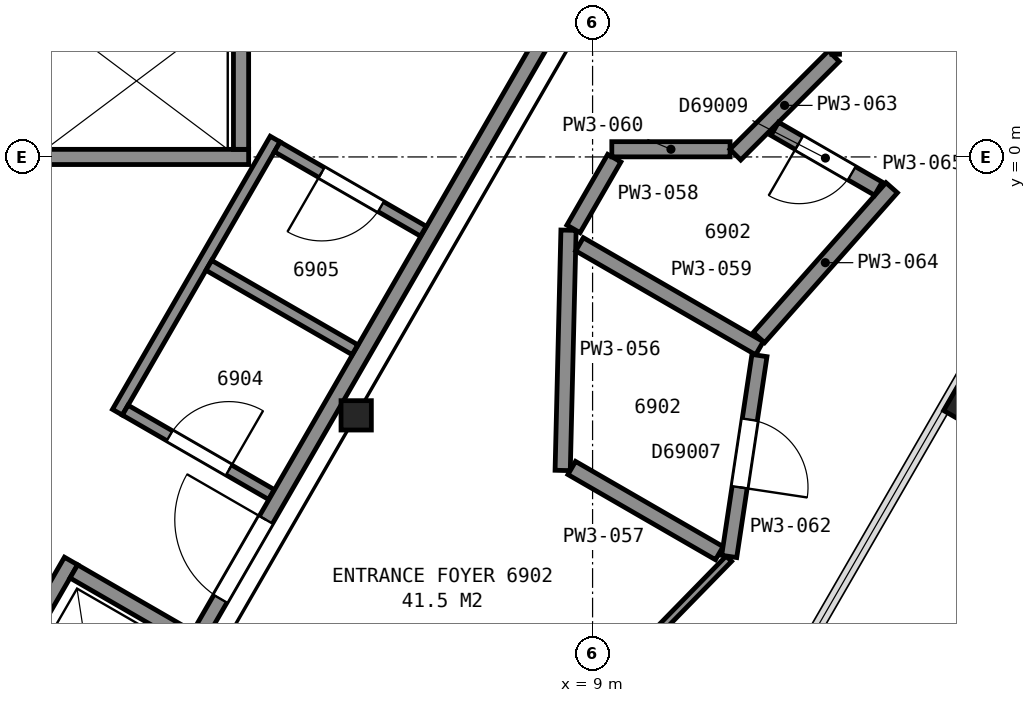
"""IFC4 building model, lengths in metres.
Left out: names, types, materials, properties, quantities, classifications, styles, units other than length and angle.
Written with IfcOpenShell. Run it as: python <this file> out.ifc"""

import sys

from ifc_helpers import new_model, si_unit, direction, frame, frame_2d, origin, origin_2d, place, context, subcontext, project, spatial, rectangle, i_section, extrude, element, fill, save


model = new_model("IFC4")
c1 = context("Model", 3, precision=1e-05, world=origin(), true_north=direction((0.0, 1.0)))
c2 = subcontext(c1, "Body", "Model", "MODEL_VIEW")
j1 = project(units=[si_unit("LENGTHUNIT", "METRE"), si_unit("PLANEANGLEUNIT", "RADIAN")], contexts=[c1])
p1 = place(None, origin())
s1 = spatial("IfcSite", under=j1, at=p1, CompositionType="ELEMENT")
p2 = place(p1, origin())
s2 = spatial("IfcBuilding", under=s1, at=p2, CompositionType="ELEMENT")
p3 = place(p2, frame((0.0, 0.0, 275.1)))
s3 = spatial("IfcBuildingStorey", under=s2, at=p3, CompositionType="ELEMENT", Elevation=275.1)
p4 = place(p3, frame((13.88, -3.26, 0.0), z_axis=(0.0, 0.0, 1.0), x_axis=(-0.5, -0.866025403784, 0.0)))
e1 = element("IfcColumn", 1, at=p4, inside=s3, PredefinedType="COLUMN", context=c2, shape_type="SweptSolid", body=[
    extrude(i_section(OverallWidth=0.394, OverallDepth=0.376, WebThickness=0.017, FlangeThickness=0.028, FilletRadius=0.015, at=origin_2d()), origin(), (0.0, 0.0, 1.0), 3.7),
])
p5 = place(p3, frame((5.89, -3.4, 0.0), z_axis=(0.0, 0.0, 1.0), x_axis=(1.0, 0.0, 0.0)))
e2 = element("IfcColumn", 2, at=p5, inside=s3, PredefinedType="COLUMN", context=c2, shape_type="SweptSolid", body=[
    extrude(i_section(OverallWidth=0.399, OverallDepth=0.386, WebThickness=0.021, FlangeThickness=0.033, FilletRadius=0.015, at=origin_2d()), origin(), (0.0, 0.0, 1.0), 3.7),
])
p6 = place(p3, frame((1.525, 0.0, 0.0), z_axis=(0.0, 0.0, 1.0), x_axis=(1.0, 0.0, 0.0)))
e3 = element("IfcWall", 3, at=p6, inside=s3, PredefinedType="PARTITIONING", context=c2, shape_type="SweptSolid", body=[
    extrude(rectangle(XDim=2.95, YDim=0.2, at=frame_2d((1.475, 0.0))), origin(), (0.0, 0.0, 1.0), 3.7),
])
p7 = place(p3, frame((0.863, -7.525, 0.0), z_axis=(0.0, 0.0, 1.0), x_axis=(0.499990435942, 0.866030925526, 0.0)))
e4 = element("IfcWall", 4, at=p7, inside=s3, PredefinedType="PARTITIONING", context=c2, shape_type="SweptSolid", body=[
    extrude(rectangle(XDim=2.55, YDim=0.2, at=frame_2d((1.275, 0.0))), origin(), (0.0, 0.0, 1.0), 3.7),
])
p8 = place(p7, frame((0.725, 0.0, 0.0)))
e5 = element("IfcOpeningElement", 5, at=p8, cuts=e4, PredefinedType="OPENING", context=c2, shape_type="SweptSolid", body=[
    extrude(rectangle(XDim=1.1, YDim=2.1, at=frame_2d((0.55, 1.05))), frame((0.0, 0.11, 0.0), z_axis=(0.0, -1.0, 0.0), x_axis=(1.0, 0.0, 0.0)), (0.0, 0.0, 1.0), 0.22),
])
p9 = place(p3, frame((4.375, 0.1, 0.0), z_axis=(0.0, 0.0, 1.0), x_axis=(0.0, 1.0, 0.0)))
e6 = element("IfcWall", 6, at=p9, inside=s3, PredefinedType="PARTITIONING", context=c2, shape_type="SweptSolid", body=[
    extrude(rectangle(XDim=1.95, YDim=0.2, at=frame_2d((0.975, 0.0))), origin(), (0.0, 0.0, 1.0), 3.7),
])
p10 = place(p3, frame((3.69, -6.328, 0.0), z_axis=(0.0, 0.0, 1.0), x_axis=(-0.866036909293, 0.499980071345, 0.0)))
e7 = element("IfcWall", 7, at=p10, inside=s3, PredefinedType="PARTITIONING", context=c2, shape_type="SweptSolid", body=[
    extrude(rectangle(XDim=1.75, YDim=0.2, at=frame_2d((0.875, 0.0))), origin(), (0.0, 0.0, 1.0), 3.7),
])
p11 = place(p3, frame((2.749, -3.359, 0.0), z_axis=(0.0, 0.0, 1.0), x_axis=(0.500017827812, 0.866015110648, 0.0)))
e8 = element("IfcWall", 8, at=p11, inside=s3, PredefinedType="PARTITIONING", context=c2, shape_type="SweptSolid", body=[
    extrude(rectangle(XDim=4.15, YDim=0.15, at=frame_2d((2.075, 0.0))), origin(), (0.0, 0.0, 1.0), 3.45),
])
p12 = place(p3, frame((2.851, -3.332, 0.0), z_axis=(0.0, 0.0, 1.0), x_axis=(0.866110524189, -0.499852538144, 0.0)))
e9 = element("IfcWall", 9, at=p12, inside=s3, PredefinedType="PARTITIONING", context=c2, shape_type="SweptSolid", body=[
    extrude(rectangle(XDim=2.22, YDim=0.15, at=frame_2d((1.11, 0.0))), origin(), (0.0, 0.0, 1.0), 3.45),
])
p13 = place(p12, frame((0.675, 0.0, 0.0)))
e10 = element("IfcOpeningElement", 10, at=p13, cuts=e9, PredefinedType="OPENING", context=c2, shape_type="SweptSolid", body=[
    extrude(rectangle(XDim=0.9, YDim=2.1, at=frame_2d((0.45, 1.05))), frame((0.0, 0.085, 0.0), z_axis=(0.0, -1.0, 0.0), x_axis=(1.0, 0.0, 0.0)), (0.0, 0.0, 1.0), 0.17),
])
p14 = place(p3, frame((3.828, -6.29, 0.0), z_axis=(0.0, 0.0, 1.0), x_axis=(0.499979739078, 0.866037101117, 0.0)))
e11 = element("IfcWall", 11, at=p14, inside=s3, PredefinedType="PARTITIONING", context=c2, shape_type="SweptSolid", body=[
    extrude(rectangle(XDim=11.363, YDim=0.2, at=frame_2d((5.681, 0.0))), origin(), (0.0, 0.0, 1.0), 3.45),
])
p15 = place(p14, frame((0.55, 0.0, 0.0)))
e12 = element("IfcOpeningElement", 12, at=p15, cuts=e11, PredefinedType="OPENING", context=c2, shape_type="SweptSolid", body=[
    extrude(rectangle(XDim=1.2, YDim=2.1, at=frame_2d((0.6, 1.05))), frame((0.0, 0.11, 0.0), z_axis=(0.0, -1.0, 0.0), x_axis=(1.0, 0.0, 0.0)), (0.0, 0.0, 1.0), 0.22),
])
p16 = place(p3, frame((3.951, -1.427, 0.0), z_axis=(0.0, 0.0, 1.0), x_axis=(0.866062920605, -0.499935013329, 0.0)))
e13 = element("IfcWall", 13, at=p16, inside=s3, PredefinedType="PARTITIONING", context=c2, shape_type="SweptSolid", body=[
    extrude(rectangle(XDim=2.22, YDim=0.15, at=frame_2d((1.11, 0.0))), origin(), (0.0, 0.0, 1.0), 3.45),
])
p17 = place(p3, frame((6.774, -0.978, 0.0), z_axis=(0.0, 0.0, 1.0), x_axis=(-0.866062920605, 0.499935013329, 0.0)))
e14 = element("IfcWall", 14, at=p17, inside=s3, PredefinedType="PARTITIONING", context=c2, shape_type="SweptSolid", body=[
    extrude(rectangle(XDim=2.22, YDim=0.15, at=frame_2d((1.11, 0.0))), origin(), (0.0, 0.0, 1.0), 3.45),
])
p18 = place(p17, frame((0.646, 0.0, 0.0)))
e15 = element("IfcOpeningElement", 15, at=p18, cuts=e14, PredefinedType="OPENING", context=c2, shape_type="SweptSolid", body=[
    extrude(rectangle(XDim=0.9, YDim=2.1, at=frame_2d((0.45, 1.05))), frame((0.0, 0.085, 0.0), z_axis=(0.0, -1.0, 0.0), x_axis=(1.0, 0.0, 0.0)), (0.0, 0.0, 1.0), 0.17),
])
p19 = place(p3, frame((7.682, -8.47, 0.0), z_axis=(0.0, 0.0, 1.0), x_axis=(0.698777378461, 0.715339203002, 0.0)))
e16 = element("IfcWall", 16, at=p19, inside=s3, PredefinedType="PARTITIONING", context=c2, shape_type="SweptSolid", body=[
    extrude(rectangle(XDim=4.452, YDim=0.1, at=frame_2d((2.226, 0.0))), origin(), (0.0, 0.0, 1.0), 2.723),
])
p20 = place(p3, frame((8.607, -4.125, 0.0), z_axis=(0.0, 0.0, 1.0), x_axis=(0.024245593124, 0.999706032399, 0.0)))
e17 = element("IfcWall", 17, at=p20, inside=s3, PredefinedType="PARTITIONING", context=c2, shape_type="SweptSolid", body=[
    extrude(rectangle(XDim=3.162, YDim=0.2, at=frame_2d((1.581, 0.0))), origin(), (0.0, 0.0, 1.0), 2.723),
])
p21 = place(p3, frame((8.726, -4.093, 0.0), z_axis=(0.0, 0.0, 1.0), x_axis=(0.866056839033, -0.499945548598, 0.0)))
e18 = element("IfcWall", 18, at=p21, inside=s3, PredefinedType="PARTITIONING", context=c2, shape_type="SweptSolid", body=[
    extrude(rectangle(XDim=2.242, YDim=0.2, at=frame_2d((1.121, 0.0))), origin(), (0.0, 0.0, 1.0), 2.723),
])
p22 = place(p3, frame((8.749, -0.947, 0.0), z_axis=(0.0, 0.0, 1.0), x_axis=(0.499656913366, 0.866223394354, 0.0)))
e19 = element("IfcWall", 19, at=p22, inside=s3, PredefinedType="PARTITIONING", context=c2, shape_type="SweptSolid", body=[
    extrude(rectangle(XDim=1.075, YDim=0.2, at=frame_2d((0.538, 0.0))), origin(), (0.0, 0.0, 1.0), 2.723),
])
p23 = place(p3, frame((8.828, -1.149, 0.0), z_axis=(0.0, 0.0, 1.0), x_axis=(0.865853899269, -0.50029693695, 0.0)))
e20 = element("IfcWall", 20, at=p23, inside=s3, PredefinedType="PARTITIONING", context=c2, shape_type="SweptSolid", body=[
    extrude(rectangle(XDim=2.734, YDim=0.2, at=frame_2d((1.367, 0.0))), origin(), (0.0, 0.0, 1.0), 2.723),
])
p24 = place(p3, frame((9.253, 0.101, 0.0), z_axis=(0.0, 0.0, 1.0), x_axis=(1.0, 0.0, 0.0)))
e21 = element("IfcWall", 21, at=p24, inside=s3, PredefinedType="PARTITIONING", context=c2, shape_type="SweptSolid", body=[
    extrude(rectangle(XDim=1.556, YDim=0.2, at=frame_2d((0.778, 0.0))), origin(), (0.0, 0.0, 1.0), 2.723),
])
p25 = place(p3, frame((10.797, -5.256, 0.0), z_axis=(0.0, 0.0, 1.0), x_axis=(0.148961207986, 0.988843040384, 0.0)))
e22 = element("IfcWall", 22, at=p25, inside=s3, PredefinedType="PARTITIONING", context=c2, shape_type="SweptSolid", body=[
    extrude(rectangle(XDim=2.673, YDim=0.2, at=frame_2d((1.336, 0.0))), origin(), (0.0, 0.0, 1.0), 2.723),
])
p26 = place(p25, frame((0.92, 0.0, 0.0)))
e23 = element("IfcOpeningElement", 23, at=p26, cuts=e22, PredefinedType="OPENING", context=c2, shape_type="SweptSolid", body=[
    extrude(rectangle(XDim=0.9, YDim=2.1, at=frame_2d((0.45, 1.05))), frame((0.0, 0.11, 0.0), z_axis=(0.0, -1.0, 0.0), x_axis=(1.0, 0.0, 0.0)), (0.0, 0.0, 1.0), 0.22),
])
p27 = place(p3, frame((10.878, 0.03, 0.0), z_axis=(0.0, 0.0, 1.0), x_axis=(0.707173379423, 0.707040176677, 0.0)))
e24 = element("IfcWall", 24, at=p27, inside=s3, PredefinedType="PARTITIONING", context=c2, shape_type="SweptSolid", body=[
    extrude(rectangle(XDim=1.833, YDim=0.2, at=frame_2d((0.917, 0.0))), origin(), (0.0, 0.0, 1.0), 2.723),
])
p28 = place(p3, frame((11.188, -2.377, 0.0), z_axis=(0.0, 0.0, 1.0), x_axis=(0.663045631266, 0.748578981043, 0.0)))
e25 = element("IfcWall", 25, at=p28, inside=s3, PredefinedType="PARTITIONING", context=c2, shape_type="SweptSolid", body=[
    extrude(rectangle(XDim=2.635, YDim=0.2, at=frame_2d((1.317, 0.0))), origin(), (0.0, 0.0, 1.0), 2.723),
])
p29 = place(p3, frame((12.761, -0.417, 0.0), z_axis=(0.0, 0.0, 1.0), x_axis=(-0.866030680601, 0.499990860175, 0.0)))
e26 = element("IfcWall", 26, at=p29, inside=s3, PredefinedType="PARTITIONING", context=c2, shape_type="SweptSolid", body=[
    extrude(rectangle(XDim=1.575, YDim=0.2, at=frame_2d((0.787, 0.0))), origin(), (0.0, 0.0, 1.0), 2.723),
])
p30 = place(p29, frame((0.405, 0.0, 0.0)))
e27 = element("IfcOpeningElement", 27, at=p30, cuts=e26, PredefinedType="OPENING", context=c2, shape_type="SweptSolid", body=[
    extrude(rectangle(XDim=0.8, YDim=2.1, at=frame_2d((0.4, 1.05))), frame((0.0, 0.11, 0.0), z_axis=(0.0, -1.0, 0.0), x_axis=(1.0, 0.0, 0.0)), (0.0, 0.0, 1.0), 0.22),
])
p31 = place(p3, frame((12.199, 3.682, 0.0), z_axis=(0.0, 0.0, 1.0), x_axis=(0.0, -1.0, 0.0)))
e28 = element("IfcWall", 28, at=p31, inside=s3, PredefinedType="PARTITIONING", context=c2, shape_type="SweptSolid", body=[
    extrude(rectangle(XDim=2.331, YDim=0.1, at=frame_2d((1.166, 0.0))), origin(), (0.0, 0.0, 1.0), 2.723),
])
p32 = place(p31, frame((0.631, 0.0, 0.0)))
e29 = element("IfcOpeningElement", 29, at=p32, cuts=e28, PredefinedType="OPENING", context=c2, shape_type="SweptSolid", body=[
    extrude(rectangle(XDim=1.0, YDim=2.1, at=frame_2d((0.5, 1.05))), frame((0.0, 0.06, 0.0), z_axis=(0.0, -1.0, 0.0), x_axis=(1.0, 0.0, 0.0)), (0.0, 0.0, 1.0), 0.12),
])
p33 = place(p13, origin())
e30 = element("IfcDoor", 30, at=p33, inside=s3, OperationType="SINGLE_SWING_RIGHT", PredefinedType="DOOR", context=c2, shape_type="SweptSolid", body=[
    extrude(rectangle(XDim=0.9, YDim=2.1, at=frame_2d((0.45, 1.05))), frame((0.0, 0.025, 0.0), z_axis=(0.0, -1.0, 0.0), x_axis=(1.0, 0.0, 0.0)), (0.0, 0.0, 1.0), 0.05),
])
fill(e10, e30)
p34 = place(p15, origin())
e31 = element("IfcDoor", 31, at=p34, inside=s3, OperationType="SINGLE_SWING_RIGHT", PredefinedType="DOOR", context=c2, shape_type="SweptSolid", body=[
    extrude(rectangle(XDim=1.2, YDim=2.1, at=frame_2d((0.6, 1.05))), frame((0.0, 0.025, 0.0), z_axis=(0.0, -1.0, 0.0), x_axis=(1.0, 0.0, 0.0)), (0.0, 0.0, 1.0), 0.05),
])
fill(e12, e31)
p35 = place(p18, origin())
e32 = element("IfcDoor", 32, at=p35, inside=s3, OperationType="SINGLE_SWING_RIGHT", PredefinedType="DOOR", context=c2, shape_type="SweptSolid", body=[
    extrude(rectangle(XDim=0.9, YDim=2.1, at=frame_2d((0.45, 1.05))), frame((0.0, 0.025, 0.0), z_axis=(0.0, -1.0, 0.0), x_axis=(1.0, 0.0, 0.0)), (0.0, 0.0, 1.0), 0.05),
])
fill(e15, e32)
p36 = place(p26, origin())
e33 = element("IfcDoor", 33, at=p36, inside=s3, OperationType="SINGLE_SWING_LEFT", PredefinedType="DOOR", context=c2, shape_type="SweptSolid", body=[
    extrude(rectangle(XDim=0.9, YDim=2.1, at=frame_2d((0.45, 1.05))), frame((0.0, 0.025, 0.0), z_axis=(0.0, -1.0, 0.0), x_axis=(1.0, 0.0, 0.0)), (0.0, 0.0, 1.0), 0.05),
])
fill(e23, e33)
p37 = place(p30, origin())
e34 = element("IfcDoor", 34, at=p37, inside=s3, OperationType="SINGLE_SWING_RIGHT", PredefinedType="DOOR", context=c2, shape_type="SweptSolid", body=[
    extrude(rectangle(XDim=0.8, YDim=2.1, at=frame_2d((0.4, 1.05))), frame((0.0, 0.025, 0.0), z_axis=(0.0, -1.0, 0.0), x_axis=(1.0, 0.0, 0.0)), (0.0, 0.0, 1.0), 0.05),
])
fill(e27, e34)
save(model, sys.argv[1])
